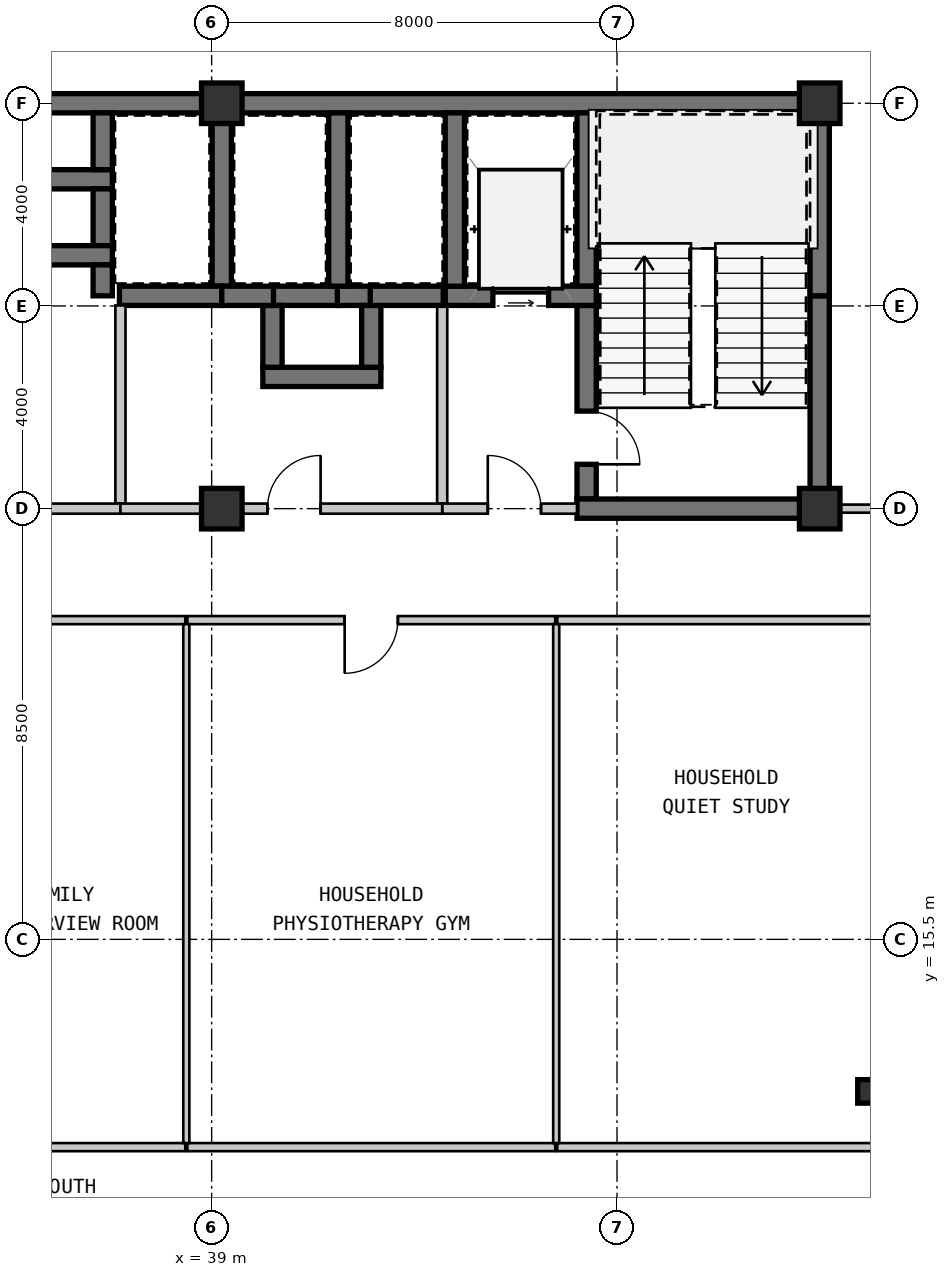
"""IFC4 building model, lengths in metres.
Left out: names, types, materials, properties, quantities, classifications, styles, units other than length and angle.
Written with IfcOpenShell. Run it as: python <this file> out.ifc"""

import sys

from ifc_helpers import new_model, si_unit, direction, frame, frame_2d, origin, origin_2d, place, context, subcontext, project, spatial, rectangle, i_section, extrude, source, transform, mapped, element, fill, save


model = new_model("IFC4")
c1 = context("Model", 3, precision=1e-05, world=origin(), true_north=direction((0.0, 1.0)))
c2 = subcontext(c1, "Body", "Model", "MODEL_VIEW")
j1 = project(units=[si_unit("LENGTHUNIT", "METRE"), si_unit("PLANEANGLEUNIT", "RADIAN")], contexts=[c1])
p1 = place(None, origin())
s1 = spatial("IfcSite", under=j1, at=p1, CompositionType="ELEMENT")
p2 = place(p1, origin())
s2 = spatial("IfcBuilding", under=s1, at=p2, CompositionType="ELEMENT")
p3 = place(p2, frame((0.0, 0.0, 32.55)))
s3 = spatial("IfcBuildingStorey", under=s2, at=p3, CompositionType="ELEMENT", Elevation=32.55)
m1 = source(origin(), c2, "Body", "SweptSolid", [
    extrude(rectangle(XDim=0.8, YDim=0.8, at=origin_2d()), origin(), (0.0, 0.0, 1.0), 3.15),
])
for number, where, z_axis, x_axis in (
    (1, (39.2, 24.0, 0.0), (0.0, 0.0, 1.0), (1.0, 0.0, 0.0)),
    (2, (51.0, 24.0, 0.0), (0.0, 0.0, 1.0), (1.0, 0.0, 0.0)),
    (3, (39.2, 32.0, 0.0), (0.0, 0.0, 1.0), (1.0, 0.0, 0.0)),
    (4, (51.0, 32.0, 0.0), (0.0, 0.0, 1.0), (1.0, 0.0, 0.0)),
):
    element("IfcColumn", number, at=place(p3, frame(where, z_axis=z_axis, x_axis=x_axis)), inside=s3, PredefinedType="COLUMN", context=c2, shape_type="MappedRepresentation", body=[
        mapped(m1, transform((0.0, 0.0, 0.0), scale=1.0)),
    ])
m2 = source(origin(), c2, "Body", "SweptSolid", [
    extrude(i_section(OverallWidth=0.5, OverallDepth=0.464, WebThickness=0.022, FlangeThickness=0.034, at=origin_2d()), origin(), (0.0, 0.0, 1.0), 3.15),
])
p4 = place(p3, frame((52.0, 12.5, 0.0), z_axis=(0.0, 0.0, 1.0), x_axis=(1.0, 0.0, 0.0)))
e5 = element("IfcColumn", 5, at=p4, inside=s3, PredefinedType="COLUMN", context=c2, shape_type="MappedRepresentation", body=[
    mapped(m2, transform((0.0, 0.0, 0.0), scale=1.0)),
])
m3 = source(origin(), c2, "Body", "SweptSolid", [
    extrude(rectangle(XDim=11.2, YDim=0.38, at=frame_2d((5.6, 0.0))), origin(), (0.0, 0.0, 1.0), 2.93),
])
p5 = place(p3, frame((28.0, 32.0, 0.0), z_axis=(0.0, 0.0, 1.0), x_axis=(1.0, 0.0, 0.0)))
e6 = element("IfcWall", 6, at=p5, inside=s3, PredefinedType="SHEAR", context=c2, shape_type="MappedRepresentation", body=[
    mapped(m3, transform((0.0, 0.0, 0.0), scale=1.0)),
])
m4 = source(origin(), c2, "Body", "SweptSolid", [
    extrude(rectangle(XDim=11.99, YDim=0.38, at=frame_2d((5.995, 0.0))), origin(), (0.0, 0.0, 1.0), 2.93),
])
p6 = place(p3, frame((39.2, 32.0, 0.0), z_axis=(0.0, 0.0, 1.0), x_axis=(1.0, 0.0, 0.0)))
e7 = element("IfcWall", 7, at=p6, inside=s3, PredefinedType="SHEAR", context=c2, shape_type="MappedRepresentation", body=[
    mapped(m4, transform((0.0, 0.0, 0.0), scale=1.0)),
])
m5 = source(origin(), c2, "Body", "SweptSolid", [
    extrude(rectangle(XDim=4.01, YDim=0.38, at=frame_2d((2.005, 0.0))), origin(), (0.0, 0.0, 1.0), 2.93),
])
p7 = place(p3, frame((51.0, 24.19, 0.0), z_axis=(0.0, 0.0, 1.0), x_axis=(0.0, 1.0, 0.0)))
e8 = element("IfcWall", 8, at=p7, inside=s3, PredefinedType="SHEAR", context=c2, shape_type="MappedRepresentation", body=[
    mapped(m5, transform((0.0, 0.0, 0.0), scale=1.0)),
])
m6 = source(origin(), c2, "Body", "SweptSolid", [
    extrude(rectangle(XDim=3.61, YDim=0.38, at=frame_2d((1.805, 0.0))), origin(), (0.0, 0.0, 1.0), 2.93),
])
p8 = place(p3, frame((51.0, 28.2, 0.0), z_axis=(0.0, 0.0, 1.0), x_axis=(0.0, 1.0, 0.0)))
e9 = element("IfcWall", 9, at=p8, inside=s3, PredefinedType="SHEAR", context=c2, shape_type="MappedRepresentation", body=[
    mapped(m6, transform((0.0, 0.0, 0.0), scale=1.0)),
])
m7 = source(origin(), c2, "Body", "SweptSolid", [
    extrude(rectangle(XDim=3.42, YDim=0.38, at=frame_2d((1.71, 0.0))), origin(), (0.0, 0.0, 1.0), 2.93),
])
p9 = place(p3, frame((46.4, 31.81, 0.0), z_axis=(0.0, 0.0, 1.0), x_axis=(0.0, -1.0, 0.0)))
e10 = element("IfcWall", 10, at=p9, inside=s3, PredefinedType="SHEAR", context=c2, shape_type="MappedRepresentation", body=[
    mapped(m7, transform((0.0, 0.0, 0.0), scale=1.0)),
])
m8 = source(origin(), c2, "Body", "SweptSolid", [
    extrude(rectangle(XDim=3.82, YDim=0.38, at=frame_2d((1.91, 0.0))), origin(), (0.0, 0.0, 1.0), 2.93),
])
p10 = place(p3, frame((46.4, 28.01, 0.0), z_axis=(0.0, 0.0, 1.0), x_axis=(0.0, -1.0, 0.0)))
e11 = element("IfcWall", 11, at=p10, inside=s3, PredefinedType="SHEAR", context=c2, shape_type="MappedRepresentation", body=[
    mapped(m8, transform((0.0, 0.0, 0.0), scale=1.0)),
])
m9 = source(origin(), c2, "Body", "SweptSolid", [
    extrude(rectangle(XDim=1.05, YDim=2.1, at=frame_2d((0.525, 1.05))), frame((0.0, 0.2, 0.0), z_axis=(0.0, -1.0, 0.0), x_axis=(1.0, 0.0, 0.0)), (0.0, 0.0, 1.0), 0.4),
])
p11 = place(p10, frame((2.085, 0.0, 0.0)))
e12 = element("IfcOpeningElement", 12, at=p11, cuts=e11, PredefinedType="OPENING", context=c2, shape_type="MappedRepresentation", body=[
    mapped(m9, transform((0.0, 0.0, 0.0), scale=1.0)),
])
m10 = source(origin(), c2, "Body", "SweptSolid", [
    extrude(rectangle(XDim=4.98, YDim=0.38, at=frame_2d((2.49, 0.0))), origin(), (0.0, 0.0, 1.0), 2.93),
])
p12 = place(p3, frame((46.21, 24.0, 0.0), z_axis=(0.0, 0.0, 1.0), x_axis=(1.0, 0.0, 0.0)))
e13 = element("IfcWall", 13, at=p12, inside=s3, PredefinedType="SHEAR", context=c2, shape_type="MappedRepresentation", body=[
    mapped(m10, transform((0.0, 0.0, 0.0), scale=1.0)),
])
m11 = source(origin(), c2, "Body", "SweptSolid", [
    extrude(rectangle(XDim=2.98, YDim=0.38, at=frame_2d((1.49, 0.0))), origin(), (0.0, 0.0, 1.0), 2.93),
])
p13 = place(p3, frame((43.61, 28.2, 0.0), z_axis=(0.0, 0.0, 1.0), x_axis=(1.0, 0.0, 0.0)))
e14 = element("IfcWall", 14, at=p13, inside=s3, PredefinedType="SHEAR", context=c2, shape_type="MappedRepresentation", body=[
    mapped(m11, transform((0.0, 0.0, 0.0), scale=1.0)),
])
m12 = source(origin(), c2, "Body", "SweptSolid", [
    extrude(rectangle(XDim=1.1, YDim=2.15, at=frame_2d((0.55, 1.075))), frame((0.0, 0.2, 0.0), z_axis=(0.0, -1.0, 0.0), x_axis=(1.0, 0.0, 0.0)), (0.0, 0.0, 1.0), 0.4),
])
p14 = place(p13, frame((0.94, 0.0, 0.0)))
e15 = element("IfcOpeningElement", 15, at=p14, cuts=e14, PredefinedType="OPENING", context=c2, shape_type="MappedRepresentation", body=[
    mapped(m12, transform((0.0, 0.0, 0.0), scale=1.0)),
])
p15 = place(p3, frame((43.8, 31.81, 0.0), z_axis=(0.0, 0.0, 1.0), x_axis=(0.0, -1.0, 0.0)))
e16 = element("IfcWall", 16, at=p15, inside=s3, PredefinedType="SHEAR", context=c2, shape_type="MappedRepresentation", body=[
    mapped(m7, transform((0.0, 0.0, 0.0), scale=1.0)),
])
m13 = source(origin(), c2, "Body", "SweptSolid", [
    extrude(rectangle(XDim=3.91, YDim=0.2, at=frame_2d((1.955, 0.0))), origin(), (0.0, 0.0, 1.0), 2.93),
])
p16 = place(p3, frame((43.55, 28.01, 0.0), z_axis=(0.0, 0.0, 1.0), x_axis=(0.0, -1.0, 0.0)))
e17 = element("IfcWall", 17, at=p16, inside=s3, PredefinedType="SOLIDWALL", context=c2, shape_type="MappedRepresentation", body=[
    mapped(m13, transform((0.0, 0.0, 0.0), scale=1.0)),
])
m14 = source(origin(), c2, "Body", "SweptSolid", [
    extrude(rectangle(XDim=2.66, YDim=0.2, at=frame_2d((1.33, 0.0))), origin(), (0.0, 0.0, 1.0), 2.397),
])
p17 = place(p3, frame((43.55, 24.0, 0.0), z_axis=(0.0, 0.0, 1.0), x_axis=(1.0, 0.0, 0.0)))
e18 = element("IfcWall", 18, at=p17, inside=s3, PredefinedType="SOLIDWALL", context=c2, shape_type="MappedRepresentation", body=[
    mapped(m14, transform((0.0, 0.0, 0.0), scale=1.0)),
])
m15 = source(origin(), c2, "Body", "SweptSolid", [
    extrude(rectangle(XDim=1.05, YDim=2.1, at=frame_2d((0.525, 1.05))), frame((0.0, 0.11, 0.0), z_axis=(0.0, -1.0, 0.0), x_axis=(1.0, 0.0, 0.0)), (0.0, 0.0, 1.0), 0.22),
])
p18 = place(p17, frame((0.9, 0.0, 0.0)))
e19 = element("IfcOpeningElement", 19, at=p18, cuts=e18, PredefinedType="OPENING", context=c2, shape_type="MappedRepresentation", body=[
    mapped(m15, transform((0.0, 0.0, 0.0), scale=1.0)),
])
m16 = source(origin(), c2, "Body", "SweptSolid", [
    extrude(rectangle(XDim=2.08, YDim=0.38, at=frame_2d((1.04, 0.0))), origin(), (0.0, 0.0, 1.0), 2.93),
])
p19 = place(p3, frame((34.96, 30.5, 0.0), z_axis=(0.0, 0.0, 1.0), x_axis=(1.0, 0.0, 0.0)))
e20 = element("IfcWall", 20, at=p19, inside=s3, PredefinedType="SHEAR", context=c2, shape_type="MappedRepresentation", body=[
    mapped(m16, transform((0.0, 0.0, 0.0), scale=1.0)),
])
m17 = source(origin(), c2, "Body", "SweptSolid", [
    extrude(rectangle(XDim=1.12, YDim=0.38, at=frame_2d((0.56, 0.0))), origin(), (0.0, 0.0, 1.0), 2.93),
])
for number, where, z_axis, x_axis in (
    (21, (36.85, 30.69, 0.0), (0.0, 0.0, 1.0), (0.0, 1.0, 0.0)),
    (22, (36.85, 29.19, 0.0), (0.0, 0.0, 1.0), (0.0, 1.0, 0.0)),
):
    element("IfcWall", number, at=place(p3, frame(where, z_axis=z_axis, x_axis=x_axis)), inside=s3, PredefinedType="SHEAR", context=c2, shape_type="MappedRepresentation", body=[
        mapped(m17, transform((0.0, 0.0, 0.0), scale=1.0)),
    ])
p20 = place(p3, frame((34.96, 29.0, 0.0), z_axis=(0.0, 0.0, 1.0), x_axis=(1.0, 0.0, 0.0)))
e23 = element("IfcWall", 23, at=p20, inside=s3, PredefinedType="SHEAR", context=c2, shape_type="MappedRepresentation", body=[
    mapped(m16, transform((0.0, 0.0, 0.0), scale=1.0)),
])
m18 = source(origin(), c2, "Body", "SweptSolid", [
    extrude(rectangle(XDim=1.32, YDim=0.38, at=frame_2d((0.66, 0.0))), origin(), (0.0, 0.0, 1.0), 2.93),
])
p21 = place(p3, frame((41.52, 28.2, 0.0), z_axis=(0.0, 0.0, 1.0), x_axis=(-1.0, 0.0, 0.0)))
e24 = element("IfcWall", 24, at=p21, inside=s3, PredefinedType="SHEAR", context=c2, shape_type="MappedRepresentation", body=[
    mapped(m18, transform((0.0, 0.0, 0.0), scale=1.0)),
])
m19 = source(origin(), c2, "Body", "SweptSolid", [
    extrude(rectangle(XDim=0.67, YDim=0.38, at=frame_2d((0.335, 0.0))), origin(), (0.0, 0.0, 1.0), 2.93),
])
p22 = place(p3, frame((42.15, 28.2, 0.0), z_axis=(0.0, 0.0, 1.0), x_axis=(-1.0, 0.0, 0.0)))
e25 = element("IfcWall", 25, at=p22, inside=s3, PredefinedType="SHEAR", context=c2, shape_type="MappedRepresentation", body=[
    mapped(m19, transform((0.0, 0.0, 0.0), scale=1.0)),
])
m20 = source(origin(), c2, "Body", "SweptSolid", [
    extrude(rectangle(XDim=2.33, YDim=0.38, at=frame_2d((1.165, 0.0))), origin(), (0.0, 0.0, 1.0), 2.93),
])
p23 = place(p3, frame((40.01, 26.6, 0.0), z_axis=(0.0, 0.0, 1.0), x_axis=(1.0, 0.0, 0.0)))
e26 = element("IfcWall", 26, at=p23, inside=s3, PredefinedType="SHEAR", context=c2, shape_type="MappedRepresentation", body=[
    mapped(m20, transform((0.0, 0.0, 0.0), scale=1.0)),
])
m21 = source(origin(), c2, "Body", "SweptSolid", [
    extrude(rectangle(XDim=1.22, YDim=0.38, at=frame_2d((0.61, 0.0))), origin(), (0.0, 0.0, 1.0), 2.93),
])
for number, where, z_axis, x_axis in (
    (27, (40.2, 28.01, 0.0), (0.0, 0.0, 1.0), (0.0, -1.0, 0.0)),
    (28, (42.15, 26.79, 0.0), (0.0, 0.0, 1.0), (0.0, 1.0, 0.0)),
):
    element("IfcWall", number, at=place(p3, frame(where, z_axis=z_axis, x_axis=x_axis)), inside=s3, PredefinedType="SHEAR", context=c2, shape_type="MappedRepresentation", body=[
        mapped(m21, transform((0.0, 0.0, 0.0), scale=1.0)),
    ])
p24 = place(p3, frame((39.2, 28.39, 0.0), z_axis=(0.0, 0.0, 1.0), x_axis=(0.0, 1.0, 0.0)))
e29 = element("IfcWall", 29, at=p24, inside=s3, PredefinedType="SHEAR", context=c2, shape_type="MappedRepresentation", body=[
    mapped(m7, transform((0.0, 0.0, 0.0), scale=1.0)),
])
m22 = source(origin(), c2, "Body", "SweptSolid", [
    extrude(rectangle(XDim=0.61, YDim=0.38, at=frame_2d((0.305, 0.0))), origin(), (0.0, 0.0, 1.0), 2.93),
])
p25 = place(p3, frame((36.85, 28.81, 0.0), z_axis=(0.0, 0.0, 1.0), x_axis=(0.0, -1.0, 0.0)))
e30 = element("IfcWall", 30, at=p25, inside=s3, PredefinedType="SHEAR", context=c2, shape_type="MappedRepresentation", body=[
    mapped(m22, transform((0.0, 0.0, 0.0), scale=1.0)),
])
m23 = source(origin(), c2, "Body", "SweptSolid", [
    extrude(rectangle(XDim=2.02, YDim=0.38, at=frame_2d((1.01, 0.0))), origin(), (0.0, 0.0, 1.0), 2.93),
])
p26 = place(p3, frame((37.18, 28.2, 0.0), z_axis=(0.0, 0.0, 1.0), x_axis=(1.0, 0.0, 0.0)))
e31 = element("IfcWall", 31, at=p26, inside=s3, PredefinedType="SHEAR", context=c2, shape_type="MappedRepresentation", body=[
    mapped(m23, transform((0.0, 0.0, 0.0), scale=1.0)),
])
p27 = place(p3, frame((41.5, 28.39, 0.0), z_axis=(0.0, 0.0, 1.0), x_axis=(0.0, 1.0, 0.0)))
e32 = element("IfcWall", 32, at=p27, inside=s3, PredefinedType="SHEAR", context=c2, shape_type="MappedRepresentation", body=[
    mapped(m7, transform((0.0, 0.0, 0.0), scale=1.0)),
])
m24 = source(origin(), c2, "Body", "SweptSolid", [
    extrude(rectangle(XDim=1.02, YDim=0.38, at=frame_2d((0.51, 0.0))), origin(), (0.0, 0.0, 1.0), 2.93),
])
p28 = place(p3, frame((39.2, 28.2, 0.0), z_axis=(0.0, 0.0, 1.0), x_axis=(1.0, 0.0, 0.0)))
e33 = element("IfcWall", 33, at=p28, inside=s3, PredefinedType="SHEAR", context=c2, shape_type="MappedRepresentation", body=[
    mapped(m24, transform((0.0, 0.0, 0.0), scale=1.0)),
])
m25 = source(origin(), c2, "Body", "SweptSolid", [
    extrude(rectangle(XDim=1.44, YDim=0.38, at=frame_2d((0.72, 0.0))), origin(), (0.0, 0.0, 1.0), 2.93),
])
p29 = place(p3, frame((42.13, 28.2, 0.0), z_axis=(0.0, 0.0, 1.0), x_axis=(1.0, 0.0, 0.0)))
e34 = element("IfcWall", 34, at=p29, inside=s3, PredefinedType="SHEAR", context=c2, shape_type="MappedRepresentation", body=[
    mapped(m25, transform((0.0, 0.0, 0.0), scale=1.0)),
])
p30 = place(p3, frame((37.2, 28.01, 0.0), z_axis=(0.0, 0.0, 1.0), x_axis=(0.0, -1.0, 0.0)))
e35 = element("IfcWall", 35, at=p30, inside=s3, PredefinedType="SOLIDWALL", context=c2, shape_type="MappedRepresentation", body=[
    mapped(m13, transform((0.0, 0.0, 0.0), scale=1.0)),
])
m26 = source(origin(), c2, "Body", "SweptSolid", [
    extrude(rectangle(XDim=6.4, YDim=0.2, at=frame_2d((3.2, 0.0))), origin(), (0.0, 0.0, 1.0), 2.47),
])
p31 = place(p3, frame((37.2, 24.0, 0.0), z_axis=(0.0, 0.0, 1.0), x_axis=(-1.0, 0.0, 0.0)))
e36 = element("IfcWall", 36, at=p31, inside=s3, PredefinedType="SOLIDWALL", context=c2, shape_type="MappedRepresentation", body=[
    mapped(m26, transform((0.0, 0.0, 0.0), scale=1.0)),
])
p32 = place(p31, frame((2.675, 0.0, 0.0)))
e37 = element("IfcOpeningElement", 37, at=p32, cuts=e36, PredefinedType="OPENING", context=c2, shape_type="MappedRepresentation", body=[
    mapped(m15, transform((0.0, 0.0, 0.0), scale=1.0)),
])
m27 = source(origin(), c2, "Body", "SweptSolid", [
    extrude(rectangle(XDim=4.35, YDim=0.2, at=frame_2d((2.175, 0.0))), origin(), (0.0, 0.0, 1.0), 2.397),
])
p33 = place(p3, frame((43.55, 24.0, 0.0), z_axis=(0.0, 0.0, 1.0), x_axis=(-1.0, 0.0, 0.0)))
e38 = element("IfcWall", 38, at=p33, inside=s3, PredefinedType="SOLIDWALL", context=c2, shape_type="MappedRepresentation", body=[
    mapped(m27, transform((0.0, 0.0, 0.0), scale=1.0)),
])
p34 = place(p33, frame((2.4, 0.0, 0.0)))
e39 = element("IfcOpeningElement", 39, at=p34, cuts=e38, PredefinedType="OPENING", context=c2, shape_type="MappedRepresentation", body=[
    mapped(m15, transform((0.0, 0.0, 0.0), scale=1.0)),
])
m28 = source(origin(), c2, "Body", "SweptSolid", [
    extrude(rectangle(XDim=2.0, YDim=0.2, at=frame_2d((1.0, 0.0))), origin(), (0.0, 0.0, 1.0), 2.47),
])
p35 = place(p3, frame((39.2, 24.0, 0.0), z_axis=(0.0, 0.0, 1.0), x_axis=(-1.0, 0.0, 0.0)))
e40 = element("IfcWall", 40, at=p35, inside=s3, PredefinedType="SOLIDWALL", context=c2, shape_type="MappedRepresentation", body=[
    mapped(m28, transform((0.0, 0.0, 0.0), scale=1.0)),
])
m29 = source(origin(), c2, "Body", "SweptSolid", [
    extrude(rectangle(XDim=7.26, YDim=0.16, at=frame_2d((3.63, 0.0))), origin(), (0.0, 0.0, 1.0), 2.93),
])
p36 = place(p3, frame((38.48, 21.8, 0.0), z_axis=(0.0, 0.0, 1.0), x_axis=(-1.0, 0.0, 0.0)))
e41 = element("IfcWall", 41, at=p36, inside=s3, PredefinedType="PARTITIONING", context=c2, shape_type="MappedRepresentation", body=[
    mapped(m29, transform((0.0, 0.0, 0.0), scale=1.0)),
])
m30 = source(origin(), c2, "Body", "SweptSolid", [
    extrude(rectangle(XDim=1.05, YDim=2.1, at=frame_2d((0.525, 1.05))), frame((0.0, 0.09, 0.0), z_axis=(0.0, -1.0, 0.0), x_axis=(1.0, 0.0, 0.0)), (0.0, 0.0, 1.0), 0.18),
])
p37 = place(p36, frame((3.105, 0.0, 0.0)))
e42 = element("IfcOpeningElement", 42, at=p37, cuts=e41, PredefinedType="OPENING", context=c2, shape_type="MappedRepresentation", body=[
    mapped(m30, transform((0.0, 0.0, 0.0), scale=1.0)),
])
p38 = place(p3, frame((45.78, 21.8, 0.0), z_axis=(0.0, 0.0, 1.0), x_axis=(-1.0, 0.0, 0.0)))
e43 = element("IfcWall", 43, at=p38, inside=s3, PredefinedType="PARTITIONING", context=c2, shape_type="MappedRepresentation", body=[
    mapped(m29, transform((0.0, 0.0, 0.0), scale=1.0)),
])
p39 = place(p38, frame((3.105, 0.0, 0.0)))
e44 = element("IfcOpeningElement", 44, at=p39, cuts=e43, PredefinedType="OPENING", context=c2, shape_type="MappedRepresentation", body=[
    mapped(m30, transform((0.0, 0.0, 0.0), scale=1.0)),
])
m31 = source(origin(), c2, "Body", "SweptSolid", [
    extrude(rectangle(XDim=7.359, YDim=0.16, at=frame_2d((3.68, 0.0))), origin(), (0.0, 0.0, 1.0), 2.93),
])
p40 = place(p3, frame((53.18, 21.8, 0.0), z_axis=(0.0, 0.0, 1.0), x_axis=(-1.0, 0.0, 0.0)))
e45 = element("IfcWall", 45, at=p40, inside=s3, PredefinedType="PARTITIONING", context=c2, shape_type="MappedRepresentation", body=[
    mapped(m31, transform((0.0, 0.0, 0.0), scale=1.0)),
])
m32 = source(origin(), c2, "Body", "SweptSolid", [
    extrude(rectangle(XDim=4.13, YDim=0.16, at=frame_2d((2.065, 0.0))), origin(), (0.0, 0.0, 1.0), 2.93),
])
p41 = place(p3, frame((51.19, 24.0, 0.0), z_axis=(0.0, 0.0, 1.0), x_axis=(1.0, 0.0, 0.0)))
e46 = element("IfcWall", 46, at=p41, inside=s3, PredefinedType="PARTITIONING", context=c2, shape_type="MappedRepresentation", body=[
    mapped(m32, transform((0.0, 0.0, 0.0), scale=1.0)),
])
for number, where, z_axis, x_axis in (
    (47, (31.22, 11.4, 0.0), (0.0, 0.0, 1.0), (1.0, 0.0, 0.0)),
    (48, (38.52, 11.4, 0.0), (0.0, 0.0, 1.0), (1.0, 0.0, 0.0)),
):
    element("IfcWall", number, at=place(p3, frame(where, z_axis=z_axis, x_axis=x_axis)), inside=s3, PredefinedType="PARTITIONING", context=c2, shape_type="MappedRepresentation", body=[
        mapped(m29, transform((0.0, 0.0, 0.0), scale=1.0)),
    ])
m33 = source(origin(), c2, "Body", "SweptSolid", [
    extrude(rectangle(XDim=7.3, YDim=0.16, at=frame_2d((3.65, 0.0))), origin(), (0.0, 0.0, 1.0), 2.93),
])
p42 = place(p3, frame((45.82, 11.4, 0.0), z_axis=(0.0, 0.0, 1.0), x_axis=(1.0, 0.0, 0.0)))
e49 = element("IfcWall", 49, at=p42, inside=s3, PredefinedType="PARTITIONING", context=c2, shape_type="MappedRepresentation", body=[
    mapped(m33, transform((0.0, 0.0, 0.0), scale=1.0)),
])
m34 = source(origin(), c2, "Body", "SweptSolid", [
    extrude(rectangle(XDim=10.24, YDim=0.12, at=frame_2d((5.12, 0.0))), origin(), (0.0, 0.0, 1.0), 2.93),
])
for number, where, z_axis, x_axis in (
    (50, (38.5, 21.72, 0.0), (0.0, 0.0, 1.0), (0.0, -1.0, 0.0)),
    (51, (45.8, 21.72, 0.0), (0.0, 0.0, 1.0), (0.0, -1.0, 0.0)),
):
    element("IfcWall", number, at=place(p3, frame(where, z_axis=z_axis, x_axis=x_axis)), inside=s3, PredefinedType="PARTITIONING", context=c2, shape_type="MappedRepresentation", body=[
        mapped(m34, transform((0.0, 0.0, 0.0), scale=1.0)),
    ])
m35 = source(origin(), c2, "Body", "SweptSolid", [
    extrude(rectangle(XDim=1.05, YDim=2.1, at=frame_2d((0.525, 1.05))), frame((0.0, 0.025, 0.0), z_axis=(0.0, -1.0, 0.0), x_axis=(1.0, 0.0, 0.0)), (0.0, 0.0, 1.0), 0.05),
])
p43 = place(p11, origin())
e52 = element("IfcDoor", 52, at=p43, inside=s3, OperationType="SINGLE_SWING_RIGHT", PredefinedType="DOOR", context=c2, shape_type="MappedRepresentation", body=[
    mapped(m35, transform((0.0, 0.0, 0.0), scale=1.0)),
])
fill(e12, e52)
m36 = source(origin(), c2, "Body", "SweptSolid", [
    extrude(rectangle(XDim=1.1, YDim=2.15, at=frame_2d((0.55, 1.075))), frame((0.0, 0.025, 0.0), z_axis=(0.0, -1.0, 0.0), x_axis=(1.0, 0.0, 0.0)), (0.0, 0.0, 1.0), 0.05),
])
p44 = place(p14, origin())
e53 = element("IfcDoor", 53, at=p44, inside=s3, OperationType="SLIDING_TO_LEFT", PredefinedType="DOOR", context=c2, shape_type="MappedRepresentation", body=[
    mapped(m36, transform((0.0, 0.0, 0.0), scale=1.0)),
])
fill(e15, e53)
p45 = place(p18, origin())
e54 = element("IfcDoor", 54, at=p45, inside=s3, OperationType="SINGLE_SWING_LEFT", PredefinedType="DOOR", context=c2, shape_type="MappedRepresentation", body=[
    mapped(m35, transform((0.0, 0.0, 0.0), scale=1.0)),
])
fill(e19, e54)
p46 = place(p34, frame((1.05, 0.0, 0.0), z_axis=(0.0, 0.0, 1.0), x_axis=(-1.0, 0.0, 0.0)))
e55 = element("IfcDoor", 55, at=p46, inside=s3, OperationType="SINGLE_SWING_RIGHT", PredefinedType="DOOR", context=c2, shape_type="MappedRepresentation", body=[
    mapped(m35, transform((0.0, 0.0, 0.0), scale=1.0)),
])
fill(e39, e55)
p47 = place(p39, origin())
e56 = element("IfcDoor", 56, at=p47, inside=s3, OperationType="SINGLE_SWING_RIGHT", PredefinedType="DOOR", context=c2, shape_type="MappedRepresentation", body=[
    mapped(m35, transform((0.0, 0.0, 0.0), scale=1.0)),
])
fill(e44, e56)
save(model, sys.argv[1])
